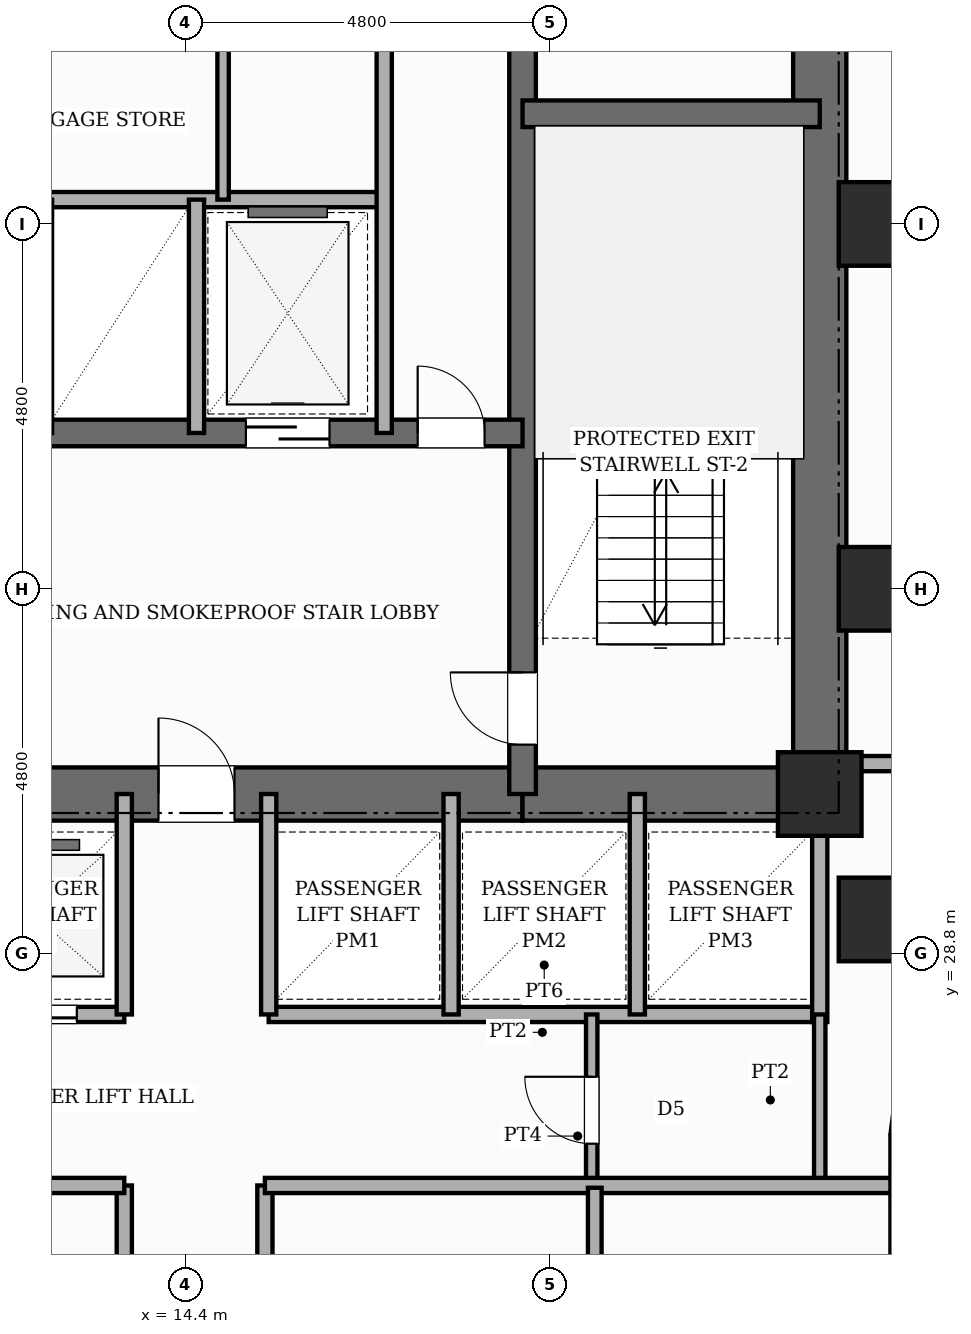
"""IFC4 building model, lengths in metres.
Left out: names, types, materials, properties, quantities, classifications, styles, units other than length and angle.
Written with IfcOpenShell. Run it as: python <this file> out.ifc"""

import sys

from ifc_helpers import new_model, si_unit, direction, frame, frame_2d, origin, origin_2d, place, context, subcontext, project, spatial, rectangle, extrude, element, fill, save


model = new_model("IFC4")
c1 = context("Model", 3, precision=1e-05, world=origin(), true_north=direction((0.0, 1.0)))
c2 = subcontext(c1, "Body", "Model", "MODEL_VIEW")
j1 = project(units=[si_unit("LENGTHUNIT", "METRE"), si_unit("PLANEANGLEUNIT", "RADIAN")], contexts=[c1])
p1 = place(None, origin())
s1 = spatial("IfcSite", under=j1, at=p1, CompositionType="ELEMENT")
p2 = place(p1, origin())
s2 = spatial("IfcBuilding", under=s1, at=p2, CompositionType="ELEMENT")
p3 = place(p2, frame((0.0, 0.0, 57.4)))
s3 = spatial("IfcBuildingStorey", under=s2, at=p3, CompositionType="ELEMENT", Elevation=57.4)
p4 = place(p3, frame((22.75, 30.55, 0.0), z_axis=(0.0, 0.0, 1.0), x_axis=(0.0, 1.0, 0.0)))
e1 = element("IfcWall", 1, at=p4, inside=s3, PredefinedType="SHEAR", context=c2, shape_type="SweptSolid", body=[
    extrude(rectangle(XDim=15.6, YDim=0.7, at=frame_2d((7.8, 0.0))), origin(), (0.0, 0.0, 1.0), 3.6),
])
p5 = place(p4, frame((10.8, 0.0, 0.0)))
e2 = element("IfcOpeningElement", 2, at=p5, cuts=e1, PredefinedType="OPENING", context=c2, shape_type="SweptSolid", body=[
    extrude(rectangle(XDim=1.0, YDim=2.15, at=frame_2d((0.5, 1.075))), frame((0.0, 0.36, 0.0), z_axis=(0.0, -1.0, 0.0), x_axis=(1.0, 0.0, 0.0)), (0.0, 0.0, 1.0), 0.72),
])
p6 = place(p3, frame((9.96, 30.9, 0.0), z_axis=(0.0, 0.0, 1.0), x_axis=(1.0, 0.0, 0.0)))
e3 = element("IfcWall", 3, at=p6, inside=s3, PredefinedType="SHEAR", context=c2, shape_type="SweptSolid", body=[
    extrude(rectangle(XDim=8.88, YDim=0.7, at=frame_2d((4.44, 0.0))), origin(), (0.0, 0.0, 1.0), 3.6),
])
p7 = place(p6, frame((4.09, 0.0, 0.0)))
e4 = element("IfcOpeningElement", 4, at=p7, cuts=e3, PredefinedType="OPENING", context=c2, shape_type="SweptSolid", body=[
    extrude(rectangle(XDim=1.0, YDim=2.15, at=frame_2d((0.5, 1.075))), frame((0.0, 0.36, 0.0), z_axis=(0.0, -1.0, 0.0), x_axis=(1.0, 0.0, 0.0)), (0.0, 0.0, 1.0), 0.72),
])
p8 = place(p3, frame((18.84, 30.9, 0.0), z_axis=(0.0, 0.0, 1.0), x_axis=(1.0, 0.0, 0.0)))
e5 = element("IfcWall", 5, at=p8, inside=s3, PredefinedType="SHEAR", context=c2, shape_type="SweptSolid", body=[
    extrude(rectangle(XDim=3.91, YDim=0.7, at=frame_2d((1.955, 0.0))), origin(), (0.0, 0.0, 1.0), 3.6),
])
p9 = place(p3, frame((18.84, 30.9, 0.0), z_axis=(0.0, 0.0, 1.0), x_axis=(0.0, 1.0, 0.0)))
e6 = element("IfcWall", 6, at=p9, inside=s3, PredefinedType="SHEAR", context=c2, shape_type="SweptSolid", body=[
    extrude(rectangle(XDim=14.9, YDim=0.35, at=frame_2d((7.45, 0.0))), origin(), (0.0, 0.0, 1.0), 3.6),
])
p10 = place(p9, frame((0.65, 0.0, 0.0)))
e7 = element("IfcOpeningElement", 7, at=p10, cuts=e6, PredefinedType="OPENING", context=c2, shape_type="SweptSolid", body=[
    extrude(rectangle(XDim=0.95, YDim=2.1, at=frame_2d((0.475, 1.05))), frame((0.0, 0.185, 0.0), z_axis=(0.0, -1.0, 0.0), x_axis=(1.0, 0.0, 0.0)), (0.0, 0.0, 1.0), 0.37),
])
p11 = place(p9, frame((10.45, 0.0, 0.0)))
e8 = element("IfcOpeningElement", 8, at=p11, cuts=e6, PredefinedType="OPENING", context=c2, shape_type="SweptSolid", body=[
    extrude(rectangle(XDim=1.0, YDim=2.15, at=frame_2d((0.5, 1.075))), frame((0.0, 0.185, 0.0), z_axis=(0.0, -1.0, 0.0), x_axis=(1.0, 0.0, 0.0)), (0.0, 0.0, 1.0), 0.37),
])
p12 = place(p3, frame((18.84, 39.85, 0.0), z_axis=(0.0, 0.0, 1.0), x_axis=(1.0, 0.0, 0.0)))
e9 = element("IfcWall", 9, at=p12, inside=s3, PredefinedType="SHEAR", context=c2, shape_type="SweptSolid", body=[
    extrude(rectangle(XDim=3.91, YDim=0.35, at=frame_2d((1.955, 0.0))), origin(), (0.0, 0.0, 1.0), 3.6),
])
p13 = place(p3, frame((9.96, 35.65, 0.0), z_axis=(0.0, 0.0, 1.0), x_axis=(1.0, 0.0, 0.0)))
e10 = element("IfcWall", 10, at=p13, inside=s3, PredefinedType="SHEAR", context=c2, shape_type="SweptSolid", body=[
    extrude(rectangle(XDim=8.88, YDim=0.35, at=frame_2d((4.44, 0.0))), origin(), (0.0, 0.0, 1.0), 3.6),
])
p14 = place(p13, frame((0.84, 0.0, 0.0)))
e11 = element("IfcOpeningElement", 11, at=p14, cuts=e10, PredefinedType="OPENING", context=c2, shape_type="SweptSolid", body=[
    extrude(rectangle(XDim=1.1, YDim=2.15, at=frame_2d((0.55, 1.075))), frame((0.0, 0.185, 0.0), z_axis=(0.0, -1.0, 0.0), x_axis=(1.0, 0.0, 0.0)), (0.0, 0.0, 1.0), 0.37),
])
p15 = place(p13, frame((5.24, 0.0, 0.0)))
e12 = element("IfcOpeningElement", 12, at=p15, cuts=e10, PredefinedType="OPENING", context=c2, shape_type="SweptSolid", body=[
    extrude(rectangle(XDim=1.1, YDim=2.15, at=frame_2d((0.55, 1.075))), frame((0.0, 0.185, 0.0), z_axis=(0.0, -1.0, 0.0), x_axis=(1.0, 0.0, 0.0)), (0.0, 0.0, 1.0), 0.37),
])
p16 = place(p13, frame((7.5, 0.0, 0.0)))
e13 = element("IfcOpeningElement", 13, at=p16, cuts=e10, PredefinedType="OPENING", context=c2, shape_type="SweptSolid", body=[
    extrude(rectangle(XDim=0.88, YDim=2.1, at=frame_2d((0.44, 1.05))), frame((0.0, 0.185, 0.0), z_axis=(0.0, -1.0, 0.0), x_axis=(1.0, 0.0, 0.0)), (0.0, 0.0, 1.0), 0.37),
])
for number, where, z_axis, x_axis in (
    (14, (22.75, 30.9, 0.0), (0.0, 0.0, 1.0), (1.0, 0.0, 0.0)),
    (15, (23.55, 29.25, 0.0), (0.0, 0.0, 1.0), (1.0, 0.0, 0.0)),
    (16, (23.55, 33.6, 0.0), (0.0, 0.0, 1.0), (1.0, 0.0, 0.0)),
    (17, (23.55, 38.4, 0.0), (0.0, 0.0, 1.0), (1.0, 0.0, 0.0)),
):
    element("IfcColumn", number, at=place(p3, frame(where, z_axis=z_axis, x_axis=x_axis)), inside=s3, PredefinedType="COLUMN", context=c2, shape_type="SweptSolid", body=[
        extrude(rectangle(XDim=1.1, YDim=1.1, at=origin_2d()), origin(), (0.0, 0.0, 1.0), 3.6),
    ])
p17 = place(p3, frame((23.923, 27.042, 0.0), z_axis=(0.0, 0.0, 1.0), x_axis=(-0.130555323746, -0.9914410257, 0.0)))
e18 = element("IfcWall", 18, at=p17, inside=s3, PredefinedType="STANDARD", context=c2, shape_type="SweptSolid", body=[
    extrude(rectangle(XDim=0.626, YDim=0.32, at=frame_2d((0.313, 0.0))), origin(), (0.0, 0.0, 1.0), 2.53),
])
p18 = place(p3, frame((23.84, 26.4, 0.0), z_axis=(0.0, 0.0, 1.0), x_axis=(0.0, -1.0, 0.0)))
e19 = element("IfcWall", 19, at=p18, inside=s3, PredefinedType="STANDARD", context=c2, shape_type="SweptSolid", body=[
    extrude(rectangle(XDim=19.2, YDim=0.32, at=frame_2d((9.6, 0.0))), origin(), (0.0, 0.0, 1.0), 2.53),
])
p19 = place(p18, frame((14.23, 0.0, 0.65)))
e20 = element("IfcOpeningElement", 20, at=p19, cuts=e19, PredefinedType="OPENING", context=c2, shape_type="SweptSolid", body=[
    extrude(rectangle(XDim=1.4, YDim=1.1, at=frame_2d((0.7, 0.55))), frame((0.0, 0.17, 0.0), z_axis=(0.0, -1.0, 0.0), x_axis=(1.0, 0.0, 0.0)), (0.0, 0.0, 1.0), 0.34),
])
p20 = place(p18, frame((8.83, 0.0, 0.65)))
e21 = element("IfcOpeningElement", 21, at=p20, cuts=e19, PredefinedType="OPENING", context=c2, shape_type="SweptSolid", body=[
    extrude(rectangle(XDim=1.4, YDim=1.1, at=frame_2d((0.7, 0.55))), frame((0.0, 0.17, 0.0), z_axis=(0.0, -1.0, 0.0), x_axis=(1.0, 0.0, 0.0)), (0.0, 0.0, 1.0), 0.34),
])
p21 = place(p18, frame((3.83, 0.0, 0.65)))
e22 = element("IfcOpeningElement", 22, at=p21, cuts=e19, PredefinedType="OPENING", context=c2, shape_type="SweptSolid", body=[
    extrude(rectangle(XDim=1.4, YDim=1.1, at=frame_2d((0.7, 0.55))), frame((0.0, 0.17, 0.0), z_axis=(0.0, -1.0, 0.0), x_axis=(1.0, 0.0, 0.0)), (0.0, 0.0, 1.0), 0.34),
])
p22 = place(p18, frame((17.639, 0.0, 0.45)))
e23 = element("IfcOpeningElement", 23, at=p22, cuts=e19, PredefinedType="OPENING", context=c2, shape_type="SweptSolid", body=[
    extrude(rectangle(XDim=0.95, YDim=1.8, at=frame_2d((0.475, 0.9))), frame((0.0, 0.17, 0.0), z_axis=(0.0, -1.0, 0.0), x_axis=(1.0, 0.0, 0.0)), (0.0, 0.0, 1.0), 0.34),
])
p23 = place(p18, frame((12.84, 0.0, 0.45)))
e24 = element("IfcOpeningElement", 24, at=p23, cuts=e19, PredefinedType="OPENING", context=c2, shape_type="SweptSolid", body=[
    extrude(rectangle(XDim=0.75, YDim=1.8, at=frame_2d((0.375, 0.9))), frame((0.0, 0.17, 0.0), z_axis=(0.0, -1.0, 0.0), x_axis=(1.0, 0.0, 0.0)), (0.0, 0.0, 1.0), 0.34),
])
p24 = place(p18, frame((5.815, 0.0, 0.45)))
e25 = element("IfcOpeningElement", 25, at=p24, cuts=e19, PredefinedType="OPENING", context=c2, shape_type="SweptSolid", body=[
    extrude(rectangle(XDim=0.6, YDim=1.8, at=frame_2d((0.3, 0.9))), frame((0.0, 0.17, 0.0), z_axis=(0.0, -1.0, 0.0), x_axis=(1.0, 0.0, 0.0)), (0.0, 0.0, 1.0), 0.34),
])
p25 = place(p18, frame((0.88, 0.0, 0.45)))
e26 = element("IfcOpeningElement", 26, at=p25, cuts=e19, PredefinedType="OPENING", context=c2, shape_type="SweptSolid", body=[
    extrude(rectangle(XDim=0.75, YDim=1.8, at=frame_2d((0.375, 0.9))), frame((0.0, 0.17, 0.0), z_axis=(0.0, -1.0, 0.0), x_axis=(1.0, 0.0, 0.0)), (0.0, 0.0, 1.0), 0.34),
])
p26 = place(p3, frame((9.96, 38.72, 0.0), z_axis=(0.0, 0.0, 1.0), x_axis=(1.0, 0.0, 0.0)))
e27 = element("IfcWall", 27, at=p26, inside=s3, PredefinedType="POLYGONAL", context=c2, shape_type="SweptSolid", body=[
    extrude(rectangle(XDim=7.06, YDim=0.2, at=frame_2d((3.53, 0.0))), origin(), (0.0, 0.0, 1.0), 3.35),
])
p27 = place(p3, frame((14.55, 35.65, 0.0), z_axis=(0.0, 0.0, 1.0), x_axis=(0.0, 1.0, 0.0)))
e28 = element("IfcWall", 28, at=p27, inside=s3, PredefinedType="POLYGONAL", context=c2, shape_type="SweptSolid", body=[
    extrude(rectangle(XDim=3.07, YDim=0.2, at=frame_2d((1.535, 0.0))), origin(), (0.0, 0.0, 1.0), 3.35),
])
p28 = place(p3, frame((17.02, 35.65, 0.0), z_axis=(0.0, 0.0, 1.0), x_axis=(0.0, 1.0, 0.0)))
e29 = element("IfcWall", 29, at=p28, inside=s3, PredefinedType="POLYGONAL", context=c2, shape_type="SweptSolid", body=[
    extrude(rectangle(XDim=5.15, YDim=0.2, at=frame_2d((2.575, 0.0))), origin(), (0.0, 0.0, 1.0), 3.35),
])
p29 = place(p3, frame((14.9, 38.72, 0.0), z_axis=(0.0, 0.0, 1.0), x_axis=(0.0, 1.0, 0.0)))
e30 = element("IfcWall", 30, at=p29, inside=s3, PredefinedType="PARTITIONING", context=c2, shape_type="SweptSolid", body=[
    extrude(rectangle(XDim=2.08, YDim=0.15, at=frame_2d((1.04, 0.0))), origin(), (0.0, 0.0, 1.0), 3.35),
])
p30 = place(p3, frame((6.05, 28.0, 0.0), z_axis=(0.0, 0.0, 1.0), x_axis=(1.0, 0.0, 0.0)))
e31 = element("IfcWall", 31, at=p30, inside=s3, PredefinedType="POLYGONAL", context=c2, shape_type="SweptSolid", body=[
    extrude(rectangle(XDim=7.55, YDim=0.2, at=frame_2d((3.775, 0.0))), origin(), (0.0, 0.0, 1.0), 3.35),
])
p31 = place(p30, frame((0.925, 0.0, 0.0)))
e32 = element("IfcOpeningElement", 32, at=p31, cuts=e31, PredefinedType="OPENING", context=c2, shape_type="SweptSolid", body=[
    extrude(rectangle(XDim=1.1, YDim=2.15, at=frame_2d((0.55, 1.075))), frame((0.0, 0.11, 0.0), z_axis=(0.0, -1.0, 0.0), x_axis=(1.0, 0.0, 0.0)), (0.0, 0.0, 1.0), 0.22),
])
p32 = place(p30, frame((3.375, 0.0, 0.0)))
e33 = element("IfcOpeningElement", 33, at=p32, cuts=e31, PredefinedType="OPENING", context=c2, shape_type="SweptSolid", body=[
    extrude(rectangle(XDim=1.1, YDim=2.15, at=frame_2d((0.55, 1.075))), frame((0.0, 0.11, 0.0), z_axis=(0.0, -1.0, 0.0), x_axis=(1.0, 0.0, 0.0)), (0.0, 0.0, 1.0), 0.22),
])
p33 = place(p30, frame((5.825, 0.0, 0.0)))
e34 = element("IfcOpeningElement", 34, at=p33, cuts=e31, PredefinedType="OPENING", context=c2, shape_type="SweptSolid", body=[
    extrude(rectangle(XDim=1.1, YDim=2.15, at=frame_2d((0.55, 1.075))), frame((0.0, 0.11, 0.0), z_axis=(0.0, -1.0, 0.0), x_axis=(1.0, 0.0, 0.0)), (0.0, 0.0, 1.0), 0.22),
])
p34 = place(p3, frame((15.5, 28.0, 0.0), z_axis=(0.0, 0.0, 1.0), x_axis=(1.0, 0.0, 0.0)))
e35 = element("IfcWall", 35, at=p34, inside=s3, PredefinedType="POLYGONAL", context=c2, shape_type="SweptSolid", body=[
    extrude(rectangle(XDim=7.25, YDim=0.2, at=frame_2d((3.625, 0.0))), origin(), (0.0, 0.0, 1.0), 3.35),
])
p35 = place(p3, frame((22.75, 27.9, 0.0), z_axis=(0.0, 0.0, 1.0), x_axis=(0.0, 1.0, 0.0)))
e36 = element("IfcWall", 36, at=p35, inside=s3, PredefinedType="POLYGONAL", context=c2, shape_type="SweptSolid", body=[
    extrude(rectangle(XDim=3.0, YDim=0.2, at=frame_2d((1.5, 0.0))), origin(), (0.0, 0.0, 1.0), 3.35),
])
for number, where, z_axis, x_axis in (
    (37, (13.6, 28.0, 0.0), (0.0, 0.0, 1.0), (0.0, 1.0, 0.0)),
    (38, (15.5, 28.0, 0.0), (0.0, 0.0, 1.0), (0.0, 1.0, 0.0)),
    (39, (17.9, 28.0, 0.0), (0.0, 0.0, 1.0), (0.0, 1.0, 0.0)),
    (40, (20.35, 28.0, 0.0), (0.0, 0.0, 1.0), (0.0, 1.0, 0.0)),
):
    element("IfcWall", number, at=place(p3, frame(where, z_axis=z_axis, x_axis=x_axis)), inside=s3, PredefinedType="POLYGONAL", context=c2, shape_type="SweptSolid", body=[
        extrude(rectangle(XDim=2.9, YDim=0.2, at=frame_2d((1.45, 0.0))), origin(), (0.0, 0.0, 1.0), 3.35),
    ])
p36 = place(p3, frame((19.75, 25.75, 0.0), z_axis=(0.0, 0.0, 1.0), x_axis=(0.0, 1.0, 0.0)))
e41 = element("IfcWall", 41, at=p36, inside=s3, PredefinedType="PARTITIONING", context=c2, shape_type="SweptSolid", body=[
    extrude(rectangle(XDim=2.25, YDim=0.15, at=frame_2d((1.125, 0.0))), origin(), (0.0, 0.0, 1.0), 3.35),
])
p37 = place(p36, frame((0.55, 0.0, 0.0)))
e42 = element("IfcOpeningElement", 42, at=p37, cuts=e41, PredefinedType="OPENING", context=c2, shape_type="SweptSolid", body=[
    extrude(rectangle(XDim=0.88, YDim=2.1, at=frame_2d((0.44, 1.05))), frame((0.0, 0.085, 0.0), z_axis=(0.0, -1.0, 0.0), x_axis=(1.0, 0.0, 0.0)), (0.0, 0.0, 1.0), 0.17),
])
p38 = place(p3, frame((22.75, 25.75, 0.0), z_axis=(0.0, 0.0, 1.0), x_axis=(0.0, 1.0, 0.0)))
e43 = element("IfcWall", 43, at=p38, inside=s3, PredefinedType="PARTITIONING", context=c2, shape_type="SweptSolid", body=[
    extrude(rectangle(XDim=2.25, YDim=0.15, at=frame_2d((1.125, 0.0))), origin(), (0.0, 0.0, 1.0), 3.35),
])
p39 = place(p3, frame((13.6, 5.12, 0.0), z_axis=(0.0, 0.0, 1.0), x_axis=(0.0, 1.0, 0.0)))
e44 = element("IfcWall", 44, at=p39, inside=s3, PredefinedType="PARTITIONING", context=c2, shape_type="SweptSolid", body=[
    extrude(rectangle(XDim=20.63, YDim=0.2, at=frame_2d((10.315, 0.0))), origin(), (0.0, 0.0, 1.0), 3.35),
])
p40 = place(p39, frame((2.939, 0.0, 0.0)))
e45 = element("IfcOpeningElement", 45, at=p40, cuts=e44, PredefinedType="OPENING", context=c2, shape_type="SweptSolid", body=[
    extrude(rectangle(XDim=0.98, YDim=2.18, at=frame_2d((0.49, 1.09))), frame((0.0, 0.11, 0.0), z_axis=(0.0, -1.0, 0.0), x_axis=(1.0, 0.0, 0.0)), (0.0, 0.0, 1.0), 0.22),
])
p41 = place(p39, frame((12.576, 0.0, 0.0)))
e46 = element("IfcOpeningElement", 46, at=p41, cuts=e44, PredefinedType="OPENING", context=c2, shape_type="SweptSolid", body=[
    extrude(rectangle(XDim=0.98, YDim=2.18, at=frame_2d((0.49, 1.09))), frame((0.0, 0.11, 0.0), z_axis=(0.0, -1.0, 0.0), x_axis=(1.0, 0.0, 0.0)), (0.0, 0.0, 1.0), 0.22),
])
p42 = place(p3, frame((15.45, 5.12, 0.0), z_axis=(0.0, 0.0, 1.0), x_axis=(0.0, 1.0, 0.0)))
e47 = element("IfcWall", 47, at=p42, inside=s3, PredefinedType="PARTITIONING", context=c2, shape_type="SweptSolid", body=[
    extrude(rectangle(XDim=20.63, YDim=0.2, at=frame_2d((10.315, 0.0))), origin(), (0.0, 0.0, 1.0), 3.35),
])
p43 = place(p42, frame((1.001, 0.0, 0.0)))
e48 = element("IfcOpeningElement", 48, at=p43, cuts=e47, PredefinedType="OPENING", context=c2, shape_type="SweptSolid", body=[
    extrude(rectangle(XDim=0.98, YDim=2.18, at=frame_2d((0.49, 1.09))), frame((0.0, 0.11, 0.0), z_axis=(0.0, -1.0, 0.0), x_axis=(1.0, 0.0, 0.0)), (0.0, 0.0, 1.0), 0.22),
])
p44 = place(p42, frame((5.88, 0.0, 0.0)))
e49 = element("IfcOpeningElement", 49, at=p44, cuts=e47, PredefinedType="OPENING", context=c2, shape_type="SweptSolid", body=[
    extrude(rectangle(XDim=0.98, YDim=2.18, at=frame_2d((0.49, 1.09))), frame((0.0, 0.11, 0.0), z_axis=(0.0, -1.0, 0.0), x_axis=(1.0, 0.0, 0.0)), (0.0, 0.0, 1.0), 0.22),
])
p45 = place(p42, frame((11.28, 0.0, 0.0)))
e50 = element("IfcOpeningElement", 50, at=p45, cuts=e47, PredefinedType="OPENING", context=c2, shape_type="SweptSolid", body=[
    extrude(rectangle(XDim=0.98, YDim=2.18, at=frame_2d((0.49, 1.09))), frame((0.0, 0.11, 0.0), z_axis=(0.0, -1.0, 0.0), x_axis=(1.0, 0.0, 0.0)), (0.0, 0.0, 1.0), 0.22),
])
p46 = place(p42, frame((16.28, 0.0, 0.0)))
e51 = element("IfcOpeningElement", 51, at=p46, cuts=e47, PredefinedType="OPENING", context=c2, shape_type="SweptSolid", body=[
    extrude(rectangle(XDim=0.98, YDim=2.18, at=frame_2d((0.49, 1.09))), frame((0.0, 0.11, 0.0), z_axis=(0.0, -1.0, 0.0), x_axis=(1.0, 0.0, 0.0)), (0.0, 0.0, 1.0), 0.22),
])
p47 = place(p3, frame((5.12, 25.75, 0.0), z_axis=(0.0, 0.0, 1.0), x_axis=(1.0, 0.0, 0.0)))
e52 = element("IfcWall", 52, at=p47, inside=s3, PredefinedType="PARTITIONING", context=c2, shape_type="SweptSolid", body=[
    extrude(rectangle(XDim=8.48, YDim=0.2, at=frame_2d((4.24, 0.0))), origin(), (0.0, 0.0, 1.0), 3.35),
])
p48 = place(p3, frame((15.45, 25.75, 0.0), z_axis=(0.0, 0.0, 1.0), x_axis=(1.0, 0.0, 0.0)))
e53 = element("IfcWall", 53, at=p48, inside=s3, PredefinedType="PARTITIONING", context=c2, shape_type="SweptSolid", body=[
    extrude(rectangle(XDim=8.23, YDim=0.2, at=frame_2d((4.115, 0.0))), origin(), (0.0, 0.0, 1.0), 3.35),
])
p49 = place(p3, frame((19.79, 22.94, 0.0), z_axis=(0.0, 0.0, 1.0), x_axis=(0.0, 1.0, 0.0)))
e54 = element("IfcWall", 54, at=p49, inside=s3, PredefinedType="PLUMBINGWALL", context=c2, shape_type="SweptSolid", body=[
    extrude(rectangle(XDim=2.78, YDim=0.18, at=frame_2d((1.39, 0.0))), origin(), (0.0, 0.0, 1.0), 3.35),
])
p50 = place(p3, frame((22.75, 31.3, 0.0), z_axis=(0.0, 0.0, 1.0), x_axis=(1.0, 0.0, 0.0)))
e55 = element("IfcWall", 55, at=p50, inside=s3, PredefinedType="PARTITIONING", context=c2, shape_type="SweptSolid", body=[
    extrude(rectangle(XDim=34.53, YDim=0.2, at=frame_2d((17.265, 0.0))), origin(), (0.0, 0.0, 1.0), 3.35),
])
p51 = place(p50, frame((4.025, 0.0, 0.0)))
e56 = element("IfcOpeningElement", 56, at=p51, cuts=e55, PredefinedType="OPENING", context=c2, shape_type="SweptSolid", body=[
    extrude(rectangle(XDim=0.95, YDim=2.15, at=frame_2d((0.475, 1.075))), frame((0.0, 0.11, 0.0), z_axis=(0.0, -1.0, 0.0), x_axis=(1.0, 0.0, 0.0)), (0.0, 0.0, 1.0), 0.22),
])
p52 = place(p50, frame((13.2, 0.0, 0.0)))
e57 = element("IfcOpeningElement", 57, at=p52, cuts=e55, PredefinedType="OPENING", context=c2, shape_type="SweptSolid", body=[
    extrude(rectangle(XDim=0.95, YDim=2.15, at=frame_2d((0.475, 1.075))), frame((0.0, 0.11, 0.0), z_axis=(0.0, -1.0, 0.0), x_axis=(1.0, 0.0, 0.0)), (0.0, 0.0, 1.0), 0.22),
])
p53 = place(p50, frame((26.08, 0.0, 0.0)))
e58 = element("IfcOpeningElement", 58, at=p53, cuts=e55, PredefinedType="OPENING", context=c2, shape_type="SweptSolid", body=[
    extrude(rectangle(XDim=0.95, YDim=2.15, at=frame_2d((0.475, 1.075))), frame((0.0, 0.11, 0.0), z_axis=(0.0, -1.0, 0.0), x_axis=(1.0, 0.0, 0.0)), (0.0, 0.0, 1.0), 0.22),
])
p54 = place(p10, origin())
e59 = element("IfcDoor", 59, at=p54, inside=s3, OperationType="SINGLE_SWING_RIGHT", PredefinedType="DOOR", context=c2, shape_type="SweptSolid", body=[
    extrude(rectangle(XDim=0.95, YDim=2.1, at=frame_2d((0.475, 1.05))), frame((0.0, 0.025, 0.0), z_axis=(0.0, -1.0, 0.0), x_axis=(1.0, 0.0, 0.0)), (0.0, 0.0, 1.0), 0.05),
])
fill(e7, e59)
p55 = place(p7, origin())
e60 = element("IfcDoor", 60, at=p55, inside=s3, OperationType="SINGLE_SWING_LEFT", PredefinedType="DOOR", context=c2, shape_type="SweptSolid", body=[
    extrude(rectangle(XDim=1.0, YDim=2.15, at=frame_2d((0.5, 1.075))), frame((0.0, 0.025, 0.0), z_axis=(0.0, -1.0, 0.0), x_axis=(1.0, 0.0, 0.0)), (0.0, 0.0, 1.0), 0.05),
])
fill(e4, e60)
p56 = place(p15, origin())
e61 = element("IfcDoor", 61, at=p56, inside=s3, OperationType="SLIDING_TO_RIGHT", PredefinedType="DOOR", context=c2, shape_type="SweptSolid", body=[
    extrude(rectangle(XDim=1.1, YDim=2.15, at=frame_2d((0.55, 1.075))), frame((0.0, 0.025, 0.0), z_axis=(0.0, -1.0, 0.0), x_axis=(1.0, 0.0, 0.0)), (0.0, 0.0, 1.0), 0.05),
])
fill(e12, e61)
p57 = place(p16, origin())
e62 = element("IfcDoor", 62, at=p57, inside=s3, OperationType="SINGLE_SWING_LEFT", PredefinedType="DOOR", context=c2, shape_type="SweptSolid", body=[
    extrude(rectangle(XDim=0.88, YDim=2.1, at=frame_2d((0.44, 1.05))), frame((0.0, 0.025, 0.0), z_axis=(0.0, -1.0, 0.0), x_axis=(1.0, 0.0, 0.0)), (0.0, 0.0, 1.0), 0.05),
])
fill(e13, e62)
p58 = place(p33, origin())
e63 = element("IfcDoor", 63, at=p58, inside=s3, OperationType="SLIDING_TO_LEFT", PredefinedType="DOOR", context=c2, shape_type="SweptSolid", body=[
    extrude(rectangle(XDim=1.1, YDim=2.15, at=frame_2d((0.55, 1.075))), frame((0.0, 0.025, 0.0), z_axis=(0.0, -1.0, 0.0), x_axis=(1.0, 0.0, 0.0)), (0.0, 0.0, 1.0), 0.05),
])
fill(e34, e63)
p59 = place(p37, origin())
e64 = element("IfcDoor", 64, at=p59, inside=s3, OperationType="SINGLE_SWING_RIGHT", PredefinedType="DOOR", context=c2, shape_type="SweptSolid", body=[
    extrude(rectangle(XDim=0.88, YDim=2.1, at=frame_2d((0.44, 1.05))), frame((0.0, 0.025, 0.0), z_axis=(0.0, -1.0, 0.0), x_axis=(1.0, 0.0, 0.0)), (0.0, 0.0, 1.0), 0.05),
])
fill(e42, e64)
save(model, sys.argv[1])
